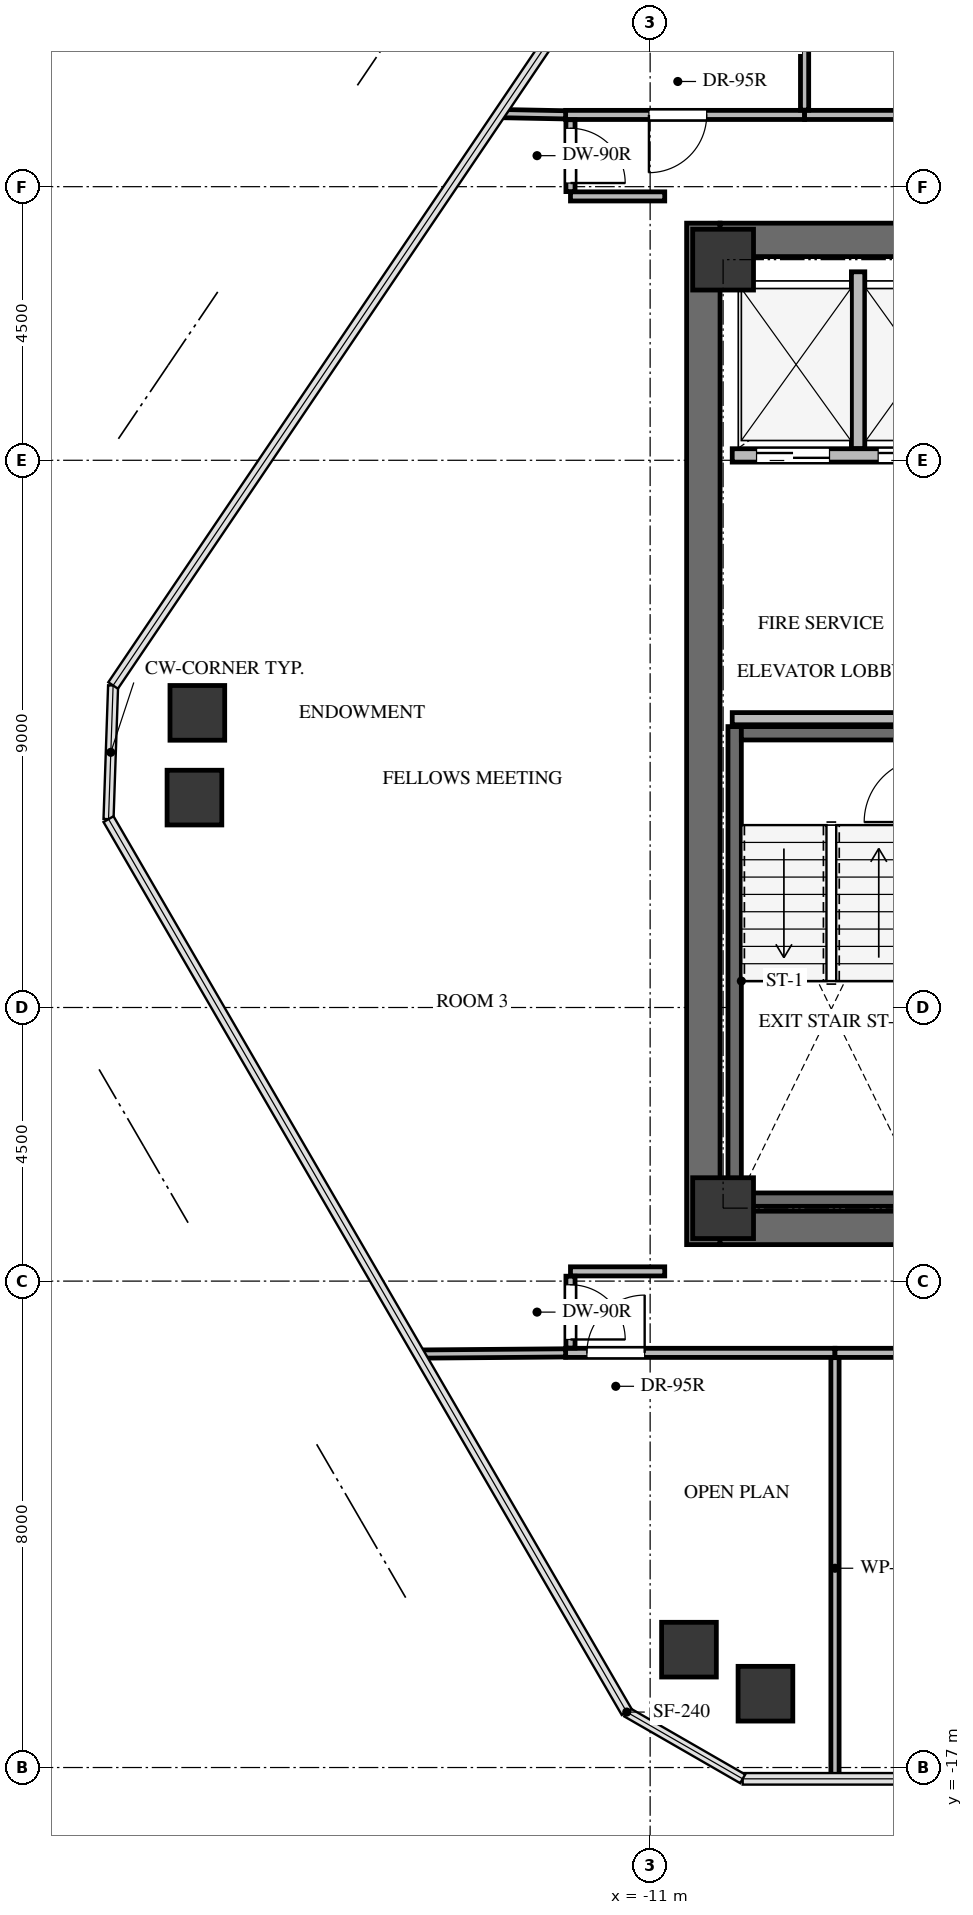
"""IFC4 building model, lengths in metres.
Left out: names, types, materials, properties, quantities, classifications, styles, units other than length and angle.
Written with IfcOpenShell. Run it as: python <this file> out.ifc"""

import sys

from ifc_helpers import new_model, si_unit, direction, frame, frame_2d, origin, origin_2d, place, context, subcontext, project, spatial, rectangle, extrude, source, transform, mapped, element, fill, save


model = new_model("IFC4")
c1 = context("Model", 3, precision=1e-05, world=origin(), true_north=direction((0.0, 1.0)))
c2 = subcontext(c1, "Body", "Model", "MODEL_VIEW")
j1 = project(units=[si_unit("LENGTHUNIT", "METRE"), si_unit("PLANEANGLEUNIT", "RADIAN")], contexts=[c1])
p1 = place(None, origin())
s1 = spatial("IfcSite", under=j1, at=p1, CompositionType="ELEMENT")
p2 = place(p1, origin())
s2 = spatial("IfcBuilding", under=s1, at=p2, CompositionType="ELEMENT")
p3 = place(p2, frame((0.0, 0.0, 254.7)))
s3 = spatial("IfcBuildingStorey", under=s2, at=p3, CompositionType="ELEMENT", Elevation=254.7)
p4 = place(p3, frame((-10.125, -8.4, 0.0), z_axis=(0.0, 0.0, 1.0), x_axis=(0.0, 1.0, 0.0)))
e1 = element("IfcWall", 1, at=p4, inside=s3, PredefinedType="SHEAR", context=c2, shape_type="SweptSolid", body=[
    extrude(rectangle(XDim=16.8, YDim=0.55, at=frame_2d((8.4, 0.0))), origin(), (0.0, 0.0, 1.0), 3.4),
])
p5 = place(p3, frame((-9.85, -8.125, 0.0), z_axis=(0.0, 0.0, 1.0), x_axis=(1.0, 0.0, 0.0)))
e2 = element("IfcWall", 2, at=p5, inside=s3, PredefinedType="SHEAR", context=c2, shape_type="SweptSolid", body=[
    extrude(rectangle(XDim=7.75, YDim=0.55, at=frame_2d((3.875, 0.0))), origin(), (0.0, 0.0, 1.0), 3.4),
])
p6 = place(p3, frame((-9.85, 8.125, 0.0), z_axis=(0.0, 0.0, 1.0), x_axis=(1.0, 0.0, 0.0)))
e3 = element("IfcWall", 3, at=p6, inside=s3, PredefinedType="SHEAR", context=c2, shape_type="SweptSolid", body=[
    extrude(rectangle(XDim=19.7, YDim=0.55, at=frame_2d((9.85, 0.0))), origin(), (0.0, 0.0, 1.0), 3.4),
])
p7 = place(p3, frame((-9.61, 0.12, -0.24), z_axis=(0.0, 0.0, 1.0), x_axis=(0.0, -1.0, 0.0)))
e4 = element("IfcWall", 4, at=p7, inside=s3, PredefinedType="SHEAR", context=c2, shape_type="SweptSolid", body=[
    extrude(rectangle(XDim=7.89, YDim=0.22, at=frame_2d((3.945, 0.0))), origin(), (0.0, 0.0, 1.0), 3.4),
])
for number, where, z_axis, x_axis in (
    (5, (-9.5, -7.66, -0.24), (0.0, 0.0, 1.0), (1.0, 0.0, 0.0)),
    (6, (-6.54, 0.01, -0.24), (0.0, 0.0, 1.0), (-1.0, 0.0, 0.0)),
):
    element("IfcWall", number, at=place(p3, frame(where, z_axis=z_axis, x_axis=x_axis)), inside=s3, PredefinedType="SHEAR", context=c2, shape_type="SweptSolid", body=[
        extrude(rectangle(XDim=2.96, YDim=0.22, at=frame_2d((1.48, 0.0))), origin(), (0.0, 0.0, 1.0), 3.4),
    ])
m1 = source(origin(), c2, "Body", "SweptSolid", [
    extrude(rectangle(XDim=1.0, YDim=1.0, at=origin_2d()), origin(), (0.0, 0.0, 1.0), 3.4),
])
for number, where, z_axis, x_axis in (
    (7, (-9.8, -7.8, -0.24), (0.0, 0.0, 1.0), (1.0, 0.0, 0.0)),
    (8, (-9.8, 7.8, -0.24), (0.0, 0.0, 1.0), (1.0, 0.0, 0.0)),
):
    element("IfcColumn", number, at=place(p3, frame(where, z_axis=z_axis, x_axis=x_axis)), inside=s3, PredefinedType="COLUMN", context=c2, shape_type="MappedRepresentation", body=[
        mapped(m1, transform((0.0, 0.0, 0.0), x_axis=(1.0, 0.0, 0.0), y_axis=(0.0, 1.0, 0.0), z_axis=(0.0, 0.0, 1.0), scale=1.0)),
    ])
m2 = source(origin(), c2, "Body", "SweptSolid", [
    extrude(rectangle(XDim=0.9, YDim=0.9, at=origin_2d()), origin(), (0.0, 0.0, 1.0), 3.4),
])
for number, where, z_axis, x_axis in (
    (9, (-10.361, -15.062, -0.24), (0.0, 0.0, 1.0), (1.0, 0.0, 0.0)),
    (10, (-18.494, -1.048, -0.24), (0.0, 0.0, 1.0), (1.0, 0.0, 0.0)),
    (11, (-18.446, 0.346, -0.24), (0.0, 0.0, 1.0), (1.0, 0.0, 0.0)),
    (12, (-9.104, -15.786, -0.24), (0.0, 0.0, 1.0), (1.0, 0.0, 0.0)),
):
    element("IfcColumn", number, at=place(p3, frame(where, z_axis=z_axis, x_axis=x_axis)), inside=s3, PredefinedType="COLUMN", context=c2, shape_type="MappedRepresentation", body=[
        mapped(m2, transform((0.0, 0.0, 0.0), x_axis=(1.0, 0.0, 0.0), y_axis=(0.0, 1.0, 0.0), z_axis=(0.0, 0.0, 1.0), scale=1.0)),
    ])
p8 = place(p3, frame((-9.65, 4.58, 0.0), z_axis=(0.0, 0.0, 1.0), x_axis=(1.0, 0.0, 0.0)))
e13 = element("IfcWall", 13, at=p8, inside=s3, PredefinedType="SOLIDWALL", context=c2, shape_type="SweptSolid", body=[
    extrude(rectangle(XDim=4.175, YDim=0.22, at=frame_2d((2.087, 0.0))), origin(), (0.0, 0.0, 1.0), 3.145),
])
p9 = place(p8, frame((0.4, 0.0, 0.0)))
e14 = element("IfcOpeningElement", 14, at=p9, cuts=e13, PredefinedType="OPENING", context=c2, shape_type="SweptSolid", body=[
    extrude(rectangle(XDim=1.2, YDim=2.15, at=frame_2d((0.6, 1.075))), frame((0.0, 0.12, 0.0), z_axis=(0.0, -1.0, 0.0), x_axis=(1.0, 0.0, 0.0)), (0.0, 0.0, 1.0), 0.24),
])
p10 = place(p8, frame((2.4, 0.0, 0.0)))
e15 = element("IfcOpeningElement", 15, at=p10, cuts=e13, PredefinedType="OPENING", context=c2, shape_type="SweptSolid", body=[
    extrude(rectangle(XDim=1.2, YDim=2.15, at=frame_2d((0.6, 1.075))), frame((0.0, 0.12, 0.0), z_axis=(0.0, -1.0, 0.0), x_axis=(1.0, 0.0, 0.0)), (0.0, 0.0, 1.0), 0.24),
])
p11 = place(p3, frame((-7.58, 4.694, 0.0), z_axis=(0.0, 0.0, 1.0), x_axis=(0.0, 1.0, 0.0)))
e16 = element("IfcWall", 16, at=p11, inside=s3, PredefinedType="SOLIDWALL", context=c2, shape_type="SweptSolid", body=[
    extrude(rectangle(XDim=2.906, YDim=0.22, at=frame_2d((1.453, 0.0))), origin(), (0.0, 0.0, 1.0), 3.145),
])
p12 = place(p3, frame((-9.65, 0.25, 0.0), z_axis=(0.0, 0.0, 1.0), x_axis=(1.0, 0.0, 0.0)))
e17 = element("IfcWall", 17, at=p12, inside=s3, PredefinedType="SOLIDWALL", context=c2, shape_type="SweptSolid", body=[
    extrude(rectangle(XDim=4.27, YDim=0.2, at=frame_2d((2.135, 0.0))), origin(), (0.0, 0.0, 1.0), 3.145),
])
p13 = place(p3, frame((-8.46, 10.18, 0.0), z_axis=(0.0, 0.0, 1.0), x_axis=(-1.0, 0.0, 0.0)))
e18 = element("IfcWall", 18, at=p13, inside=s3, PredefinedType="PARTITIONING", context=c2, shape_type="SweptSolid", body=[
    extrude(rectangle(XDim=3.93, YDim=0.15, at=frame_2d((1.965, 0.0))), origin(), (0.0, 0.0, 1.0), 2.401),
])
p14 = place(p13, frame((1.61, 0.0, 0.0)))
e19 = element("IfcOpeningElement", 19, at=p14, cuts=e18, PredefinedType="OPENING", context=c2, shape_type="SweptSolid", body=[
    extrude(rectangle(XDim=0.95, YDim=2.1, at=frame_2d((0.475, 1.05))), frame((0.0, 0.085, 0.0), z_axis=(0.0, -1.0, 0.0), x_axis=(1.0, 0.0, 0.0)), (0.0, 0.0, 1.0), 0.17),
])
p15 = place(p3, frame((-1.01, 10.18, 0.0), z_axis=(0.0, 0.0, 1.0), x_axis=(-1.0, 0.0, 0.0)))
e20 = element("IfcWall", 20, at=p15, inside=s3, PredefinedType="PARTITIONING", context=c2, shape_type="SweptSolid", body=[
    extrude(rectangle(XDim=7.45, YDim=0.15, at=frame_2d((3.725, 0.0))), origin(), (0.0, 0.0, 1.0), 2.401),
])
p16 = place(p15, frame((3.265, 0.0, 0.0)))
e21 = element("IfcOpeningElement", 21, at=p16, cuts=e20, PredefinedType="OPENING", context=c2, shape_type="SweptSolid", body=[
    extrude(rectangle(XDim=0.92, YDim=2.1, at=frame_2d((0.46, 1.05))), frame((0.0, 0.085, 0.0), z_axis=(0.0, -1.0, 0.0), x_axis=(1.0, 0.0, 0.0)), (0.0, 0.0, 1.0), 0.17),
])
p17 = place(p3, frame((-12.39, -10.18, 0.0), z_axis=(0.0, 0.0, 1.0), x_axis=(1.0, 0.0, 0.0)))
e22 = element("IfcWall", 22, at=p17, inside=s3, PredefinedType="PARTITIONING", context=c2, shape_type="SweptSolid", body=[
    extrude(rectangle(XDim=4.43, YDim=0.15, at=frame_2d((2.215, 0.0))), origin(), (0.0, 0.0, 1.0), 3.145),
])
p18 = place(p17, frame((0.35, 0.0, 0.0)))
e23 = element("IfcOpeningElement", 23, at=p18, cuts=e22, PredefinedType="OPENING", context=c2, shape_type="SweptSolid", body=[
    extrude(rectangle(XDim=0.95, YDim=2.1, at=frame_2d((0.475, 1.05))), frame((0.0, 0.085, 0.0), z_axis=(0.0, -1.0, 0.0), x_axis=(1.0, 0.0, 0.0)), (0.0, 0.0, 1.0), 0.17),
])
p19 = place(p3, frame((-7.96, -10.18, 0.0), z_axis=(0.0, 0.0, 1.0), x_axis=(1.0, 0.0, 0.0)))
e24 = element("IfcWall", 24, at=p19, inside=s3, PredefinedType="PARTITIONING", context=c2, shape_type="SweptSolid", body=[
    extrude(rectangle(XDim=5.5, YDim=0.15, at=frame_2d((2.75, 0.0))), origin(), (0.0, 0.0, 1.0), 2.401),
])
p20 = place(p19, frame((2.29, 0.0, 0.0)))
e25 = element("IfcOpeningElement", 25, at=p20, cuts=e24, PredefinedType="OPENING", context=c2, shape_type="SweptSolid", body=[
    extrude(rectangle(XDim=0.92, YDim=2.1, at=frame_2d((0.46, 1.05))), frame((0.0, 0.085, 0.0), z_axis=(0.0, -1.0, 0.0), x_axis=(1.0, 0.0, 0.0)), (0.0, 0.0, 1.0), 0.17),
])
p21 = place(p3, frame((-10.76, -8.84, 0.0), z_axis=(0.0, 0.0, 1.0), x_axis=(-1.0, 0.0, 0.0)))
e26 = element("IfcWall", 26, at=p21, inside=s3, PredefinedType="PARTITIONING", context=c2, shape_type="SweptSolid", body=[
    extrude(rectangle(XDim=1.55, YDim=0.15, at=frame_2d((0.775, 0.0))), origin(), (0.0, 0.0, 1.0), 3.145),
])
p22 = place(p3, frame((-12.31, -8.919, 0.0), z_axis=(0.0, 0.0, 1.0), x_axis=(0.0, -1.0, 0.0)))
e27 = element("IfcWall", 27, at=p22, inside=s3, PredefinedType="PARTITIONING", context=c2, shape_type="SweptSolid", body=[
    extrude(rectangle(XDim=1.182, YDim=0.15, at=frame_2d((0.591, 0.0))), origin(), (0.0, 0.0, 1.0), 3.145),
])
p23 = place(p22, frame((0.141, 0.0, 0.0)))
e28 = element("IfcOpeningElement", 28, at=p23, cuts=e27, PredefinedType="OPENING", context=c2, shape_type="SweptSolid", body=[
    extrude(rectangle(XDim=0.9, YDim=2.05, at=frame_2d((0.45, 1.025))), frame((0.0, 0.085, 0.0), z_axis=(0.0, -1.0, 0.0), x_axis=(1.0, 0.0, 0.0)), (0.0, 0.0, 1.0), 0.17),
])
p24 = place(p3, frame((-12.31, 8.84, 0.0), z_axis=(0.0, 0.0, 1.0), x_axis=(1.0, 0.0, 0.0)))
e29 = element("IfcWall", 29, at=p24, inside=s3, PredefinedType="PARTITIONING", context=c2, shape_type="SweptSolid", body=[
    extrude(rectangle(XDim=1.55, YDim=0.15, at=frame_2d((0.775, 0.0))), origin(), (0.0, 0.0, 1.0), 3.145),
])
p25 = place(p3, frame((-12.31, 10.101, 0.0), z_axis=(0.0, 0.0, 1.0), x_axis=(0.0, -1.0, 0.0)))
e30 = element("IfcWall", 30, at=p25, inside=s3, PredefinedType="PARTITIONING", context=c2, shape_type="SweptSolid", body=[
    extrude(rectangle(XDim=1.182, YDim=0.15, at=frame_2d((0.591, 0.0))), origin(), (0.0, 0.0, 1.0), 2.499),
])
p26 = place(p25, frame((0.141, 0.0, 0.0)))
e31 = element("IfcOpeningElement", 31, at=p26, cuts=e30, PredefinedType="OPENING", context=c2, shape_type="SweptSolid", body=[
    extrude(rectangle(XDim=0.9, YDim=2.05, at=frame_2d((0.45, 1.025))), frame((0.0, 0.085, 0.0), z_axis=(0.0, -1.0, 0.0), x_axis=(1.0, 0.0, 0.0)), (0.0, 0.0, 1.0), 0.17),
])
p27 = place(p3, frame((-8.46, 14.361, 0.0), z_axis=(0.0, 0.0, 1.0), x_axis=(0.0, -1.0, 0.0)))
e32 = element("IfcWall", 32, at=p27, inside=s3, PredefinedType="PARTITIONING", context=c2, shape_type="SweptSolid", body=[
    extrude(rectangle(XDim=4.102, YDim=0.135, at=frame_2d((2.051, 0.0))), origin(), (0.0, 0.0, 1.0), 2.401),
])
p28 = place(p3, frame((-12.39, 10.181, 0.0), z_axis=(0.0, 0.0, 1.0), x_axis=(-0.999812128272, 0.019383192748, 0.0)))
e33 = element("IfcWall", 33, at=p28, inside=s3, PredefinedType="PARTITIONING", context=c2, shape_type="SweptSolid", body=[
    extrude(rectangle(XDim=1.083, YDim=0.135, at=frame_2d((0.542, 0.0))), origin(), (0.0, 0.0, 1.0), 3.145),
])
p29 = place(p3, frame((-7.96, -10.259, 0.0), z_axis=(0.0, 0.0, 1.0), x_axis=(0.0, -1.0, 0.0)))
e34 = element("IfcWall", 34, at=p29, inside=s3, PredefinedType="PARTITIONING", context=c2, shape_type="SweptSolid", body=[
    extrude(rectangle(XDim=6.927, YDim=0.135, at=frame_2d((3.463, 0.0))), origin(), (0.0, 0.0, 1.0), 2.401),
])
p30 = place(p3, frame((-14.802, -10.2, 0.0), z_axis=(0.0, 0.0, 1.0), x_axis=(0.999968020968, 0.007997314604, 0.0)))
e35 = element("IfcWall", 35, at=p30, inside=s3, PredefinedType="PARTITIONING", context=c2, shape_type="SweptSolid", body=[
    extrude(rectangle(XDim=2.412, YDim=0.135, at=frame_2d((1.206, 0.0))), origin(), (0.0, 0.0, 1.0), 2.499),
])
m3 = source(origin(), c2, "Body", "SweptSolid", [
    extrude(rectangle(XDim=1.2, YDim=2.15, at=frame_2d((0.6, 1.075))), frame((0.0, 0.025, 0.0), z_axis=(0.0, -1.0, 0.0), x_axis=(1.0, 0.0, 0.0)), (0.0, 0.0, 1.0), 0.05),
])
p31 = place(p9, origin())
e36 = element("IfcDoor", 36, at=p31, inside=s3, OperationType="DOUBLE_DOOR_SLIDING", PredefinedType="DOOR", context=c2, shape_type="MappedRepresentation", body=[
    mapped(m3, transform((0.0, 0.0, 0.0), x_axis=(1.0, 0.0, 0.0), y_axis=(0.0, 1.0, 0.0), z_axis=(0.0, 0.0, 1.0), scale=1.0)),
])
fill(e14, e36)
p32 = place(p10, origin())
e37 = element("IfcDoor", 37, at=p32, inside=s3, OperationType="DOUBLE_DOOR_SLIDING", PredefinedType="DOOR", context=c2, shape_type="MappedRepresentation", body=[
    mapped(m3, transform((0.0, 0.0, 0.0), x_axis=(1.0, 0.0, 0.0), y_axis=(0.0, 1.0, 0.0), z_axis=(0.0, 0.0, 1.0), scale=1.0)),
])
fill(e15, e37)
m4 = source(origin(), c2, "Body", "SweptSolid", [
    extrude(rectangle(XDim=0.95, YDim=2.1, at=frame_2d((0.475, 1.05))), frame((0.0, 0.025, 0.0), z_axis=(0.0, -1.0, 0.0), x_axis=(1.0, 0.0, 0.0)), (0.0, 0.0, 1.0), 0.05),
])
p33 = place(p14, origin())
e38 = element("IfcDoor", 38, at=p33, inside=s3, OperationType="SINGLE_SWING_RIGHT", PredefinedType="DOOR", context=c2, shape_type="MappedRepresentation", body=[
    mapped(m4, transform((0.0, 0.0, 0.0), x_axis=(1.0, 0.0, 0.0), y_axis=(0.0, 1.0, 0.0), z_axis=(0.0, 0.0, 1.0), scale=1.0)),
])
fill(e19, e38)
p34 = place(p18, origin())
e39 = element("IfcDoor", 39, at=p34, inside=s3, OperationType="SINGLE_SWING_RIGHT", PredefinedType="DOOR", context=c2, shape_type="MappedRepresentation", body=[
    mapped(m4, transform((0.0, 0.0, 0.0), x_axis=(1.0, 0.0, 0.0), y_axis=(0.0, 1.0, 0.0), z_axis=(0.0, 0.0, 1.0), scale=1.0)),
])
fill(e23, e39)
m5 = source(origin(), c2, "Body", "SweptSolid", [
    extrude(rectangle(XDim=0.9, YDim=2.05, at=frame_2d((0.45, 1.025))), frame((0.0, 0.025, 0.0), z_axis=(0.0, -1.0, 0.0), x_axis=(1.0, 0.0, 0.0)), (0.0, 0.0, 1.0), 0.05),
])
p35 = place(p23, origin())
e40 = element("IfcDoor", 40, at=p35, inside=s3, OperationType="SINGLE_SWING_RIGHT", PredefinedType="DOOR", context=c2, shape_type="MappedRepresentation", body=[
    mapped(m5, transform((0.0, 0.0, 0.0), x_axis=(1.0, 0.0, 0.0), y_axis=(0.0, 1.0, 0.0), z_axis=(0.0, 0.0, 1.0), scale=1.0)),
])
fill(e28, e40)
p36 = place(p26, origin())
e41 = element("IfcDoor", 41, at=p36, inside=s3, OperationType="SINGLE_SWING_RIGHT", PredefinedType="DOOR", context=c2, shape_type="MappedRepresentation", body=[
    mapped(m5, transform((0.0, 0.0, 0.0), x_axis=(1.0, 0.0, 0.0), y_axis=(0.0, 1.0, 0.0), z_axis=(0.0, 0.0, 1.0), scale=1.0)),
])
fill(e31, e41)
save(model, sys.argv[1])
